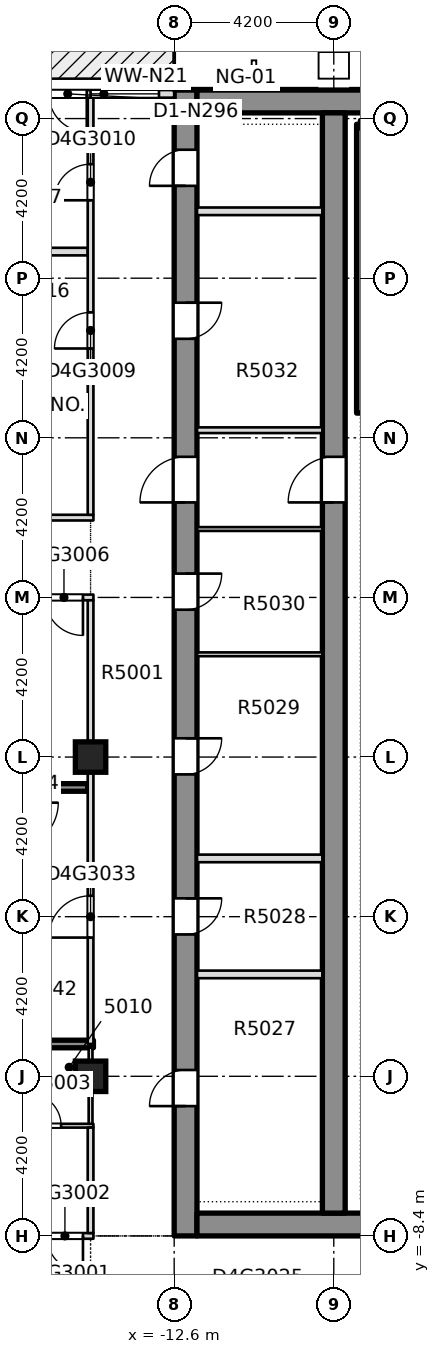
"""IFC4 building model, lengths in metres.
Left out: names, types, materials, properties, quantities, classifications, styles, units other than length and angle.
Written with IfcOpenShell. Run it as: python <this file> out.ifc"""

import sys

from ifc_helpers import new_model, si_unit, direction, frame, frame_2d, origin, origin_2d, place, context, subcontext, project, spatial, rectangle, extrude, element, fill, save


model = new_model("IFC4")
c1 = context("Model", 3, precision=1e-05, world=origin(), true_north=direction((0.0, 1.0)))
c2 = subcontext(c1, "Body", "Model", "MODEL_VIEW")
j1 = project(units=[si_unit("LENGTHUNIT", "METRE"), si_unit("PLANEANGLEUNIT", "RADIAN")], contexts=[c1])
p1 = place(None, origin())
s1 = spatial("IfcSite", under=j1, at=p1, CompositionType="ELEMENT")
p2 = place(p1, origin())
s2 = spatial("IfcBuilding", under=s1, at=p2, CompositionType="ELEMENT")
p3 = place(p2, frame((0.0, 0.0, 192.8)))
s3 = spatial("IfcBuildingStorey", under=s2, at=p3, CompositionType="ELEMENT", Elevation=192.8)
p4 = place(p3, frame((-12.3, -8.4, -0.4), z_axis=(0.0, 0.0, 1.0), x_axis=(0.0, 1.0, 0.0)))
e1 = element("IfcWall", 1, at=p4, inside=s3, PredefinedType="SHEAR", context=c2, shape_type="SweptSolid", body=[
    extrude(rectangle(XDim=30.15, YDim=0.6, at=frame_2d((15.075, 0.0))), origin(), (0.0, 0.0, 1.0), 3.45),
])
p5 = place(p4, frame((3.416, 0.0, 0.4)))
e2 = element("IfcOpeningElement", 2, at=p5, cuts=e1, PredefinedType="OPENING", context=c2, shape_type="SweptSolid", body=[
    extrude(rectangle(XDim=0.95, YDim=2.1, at=frame_2d((0.475, 1.05))), frame((0.0, 0.31, 0.0), z_axis=(0.0, -1.0, 0.0), x_axis=(1.0, 0.0, 0.0)), (0.0, 0.0, 1.0), 0.62),
])
p6 = place(p4, frame((7.932, 0.0, 0.4)))
e3 = element("IfcOpeningElement", 3, at=p6, cuts=e1, PredefinedType="OPENING", context=c2, shape_type="SweptSolid", body=[
    extrude(rectangle(XDim=0.95, YDim=2.1, at=frame_2d((0.475, 1.05))), frame((0.0, 0.31, 0.0), z_axis=(0.0, -1.0, 0.0), x_axis=(1.0, 0.0, 0.0)), (0.0, 0.0, 1.0), 0.62),
])
p7 = place(p4, frame((12.144, 0.0, 0.4)))
e4 = element("IfcOpeningElement", 4, at=p7, cuts=e1, PredefinedType="OPENING", context=c2, shape_type="SweptSolid", body=[
    extrude(rectangle(XDim=0.95, YDim=2.1, at=frame_2d((0.475, 1.05))), frame((0.0, 0.31, 0.0), z_axis=(0.0, -1.0, 0.0), x_axis=(1.0, 0.0, 0.0)), (0.0, 0.0, 1.0), 0.62),
])
p8 = place(p4, frame((16.477, 0.0, 0.4)))
e5 = element("IfcOpeningElement", 5, at=p8, cuts=e1, PredefinedType="OPENING", context=c2, shape_type="SweptSolid", body=[
    extrude(rectangle(XDim=0.95, YDim=2.1, at=frame_2d((0.475, 1.05))), frame((0.0, 0.31, 0.0), z_axis=(0.0, -1.0, 0.0), x_axis=(1.0, 0.0, 0.0)), (0.0, 0.0, 1.0), 0.62),
])
p9 = place(p4, frame((23.605, 0.0, 0.4)))
e6 = element("IfcOpeningElement", 6, at=p9, cuts=e1, PredefinedType="OPENING", context=c2, shape_type="SweptSolid", body=[
    extrude(rectangle(XDim=0.95, YDim=2.1, at=frame_2d((0.475, 1.05))), frame((0.0, 0.31, 0.0), z_axis=(0.0, -1.0, 0.0), x_axis=(1.0, 0.0, 0.0)), (0.0, 0.0, 1.0), 0.62),
])
p10 = place(p4, frame((27.63, 0.0, 0.4)))
e7 = element("IfcOpeningElement", 7, at=p10, cuts=e1, PredefinedType="OPENING", context=c2, shape_type="SweptSolid", body=[
    extrude(rectangle(XDim=0.95, YDim=2.1, at=frame_2d((0.475, 1.05))), frame((0.0, 0.31, 0.0), z_axis=(0.0, -1.0, 0.0), x_axis=(1.0, 0.0, 0.0)), (0.0, 0.0, 1.0), 0.62),
])
p11 = place(p4, frame((19.3, 0.0, 0.4)))
e8 = element("IfcOpeningElement", 8, at=p11, cuts=e1, PredefinedType="OPENING", context=c2, shape_type="SweptSolid", body=[
    extrude(rectangle(XDim=1.2, YDim=2.1, at=frame_2d((0.6, 1.05))), frame((0.0, 0.31, 0.0), z_axis=(0.0, -1.0, 0.0), x_axis=(1.0, 0.0, 0.0)), (0.0, 0.0, 1.0), 0.62),
])
p12 = place(p3, frame((-12.0, -8.1, -0.4), z_axis=(0.0, 0.0, 1.0), x_axis=(1.0, 0.0, 0.0)))
e9 = element("IfcWall", 9, at=p12, inside=s3, PredefinedType="SHEAR", context=c2, shape_type="SweptSolid", body=[
    extrude(rectangle(XDim=24.0, YDim=0.6, at=frame_2d((12.0, 0.0))), origin(), (0.0, 0.0, 1.0), 3.45),
])
p13 = place(p12, frame((7.25, 0.0, 0.4)))
e10 = element("IfcOpeningElement", 10, at=p13, cuts=e9, PredefinedType="OPENING", context=c2, shape_type="SweptSolid", body=[
    extrude(rectangle(XDim=1.8, YDim=2.1, at=frame_2d((0.9, 1.05))), frame((0.0, 0.31, 0.0), z_axis=(0.0, -1.0, 0.0), x_axis=(1.0, 0.0, 0.0)), (0.0, 0.0, 1.0), 0.62),
])
p14 = place(p12, frame((14.95, 0.0, 0.4)))
e11 = element("IfcOpeningElement", 11, at=p14, cuts=e9, PredefinedType="OPENING", context=c2, shape_type="SweptSolid", body=[
    extrude(rectangle(XDim=1.8, YDim=2.1, at=frame_2d((0.9, 1.05))), frame((0.0, 0.31, 0.0), z_axis=(0.0, -1.0, 0.0), x_axis=(1.0, 0.0, 0.0)), (0.0, 0.0, 1.0), 0.62),
])
p15 = place(p3, frame((-12.0, 21.45, -0.4), z_axis=(0.0, 0.0, 1.0), x_axis=(1.0, 0.0, 0.0)))
e12 = element("IfcWall", 12, at=p15, inside=s3, PredefinedType="SHEAR", context=c2, shape_type="SweptSolid", body=[
    extrude(rectangle(XDim=24.0, YDim=0.6, at=frame_2d((12.0, 0.0))), origin(), (0.0, 0.0, 1.0), 3.45),
])
p16 = place(p3, frame((-8.4, -7.8, -0.4), z_axis=(0.0, 0.0, 1.0), x_axis=(0.0, 1.0, 0.0)))
e13 = element("IfcWall", 13, at=p16, inside=s3, PredefinedType="SHEAR", context=c2, shape_type="SweptSolid", body=[
    extrude(rectangle(XDim=28.95, YDim=0.6, at=frame_2d((14.475, 0.0))), origin(), (0.0, 0.0, 1.0), 3.45),
])
p17 = place(p16, frame((18.7, 0.0, 0.4)))
e14 = element("IfcOpeningElement", 14, at=p17, cuts=e13, PredefinedType="OPENING", context=c2, shape_type="SweptSolid", body=[
    extrude(rectangle(XDim=1.2, YDim=2.1, at=frame_2d((0.6, 1.05))), frame((0.0, 0.31, 0.0), z_axis=(0.0, -1.0, 0.0), x_axis=(1.0, 0.0, 0.0)), (0.0, 0.0, 1.0), 0.62),
])
for number, where, z_axis, x_axis in (
    (15, (-14.8, -4.2, -0.4), (0.0, 0.0, 1.0), (1.0, 0.0, 0.0)),
    (16, (-14.8, 4.2, -0.4), (0.0, 0.0, 1.0), (1.0, 0.0, 0.0)),
):
    element("IfcColumn", number, at=place(p3, frame(where, z_axis=z_axis, x_axis=x_axis)), inside=s3, PredefinedType="COLUMN", context=c2, shape_type="SweptSolid", body=[
        extrude(rectangle(XDim=0.8, YDim=0.8, at=origin_2d()), origin(), (0.0, 0.0, 1.0), 3.45),
    ])
p18 = place(p3, frame((-25.75, -8.4, 0.0), z_axis=(0.0, 0.0, 1.0), x_axis=(1.0, 0.0, 0.0)))
e17 = element("IfcWall", 17, at=p18, inside=s3, PredefinedType="PARTITIONING", context=c2, shape_type="SweptSolid", body=[
    extrude(rectangle(XDim=11.025, YDim=0.15, at=frame_2d((5.512, 0.0))), origin(), (0.0, 0.0, 1.0), 3.05),
])
p19 = place(p18, frame((9.8, 0.0, 0.0)))
e18 = element("IfcOpeningElement", 18, at=p19, cuts=e17, PredefinedType="OPENING", context=c2, shape_type="SweptSolid", body=[
    extrude(rectangle(XDim=0.95, YDim=2.1, at=frame_2d((0.475, 1.05))), frame((0.0, 0.085, 0.0), z_axis=(0.0, -1.0, 0.0), x_axis=(1.0, 0.0, 0.0)), (0.0, 0.0, 1.0), 0.17),
])
p20 = place(p3, frame((-17.25, -5.5, 0.0), z_axis=(0.0, 0.0, 1.0), x_axis=(1.0, 0.0, 0.0)))
e19 = element("IfcWall", 19, at=p20, inside=s3, PredefinedType="PARTITIONING", context=c2, shape_type="SweptSolid", body=[
    extrude(rectangle(XDim=2.525, YDim=0.1, at=frame_2d((1.262, 0.0))), origin(), (0.0, 0.0, 1.0), 3.05),
])
p21 = place(p20, frame((0.825, 0.0, 0.0)))
e20 = element("IfcOpeningElement", 20, at=p21, cuts=e19, PredefinedType="OPENING", context=c2, shape_type="SweptSolid", body=[
    extrude(rectangle(XDim=0.85, YDim=2.1, at=frame_2d((0.425, 1.05))), frame((0.0, 0.06, 0.0), z_axis=(0.0, -1.0, 0.0), x_axis=(1.0, 0.0, 0.0)), (0.0, 0.0, 1.0), 0.12),
])
p22 = place(p3, frame((-17.25, -3.35, 0.0), z_axis=(0.0, 0.0, 1.0), x_axis=(1.0, 0.0, 0.0)))
e21 = element("IfcWall", 21, at=p22, inside=s3, PredefinedType="SOLIDWALL", context=c2, shape_type="SweptSolid", body=[
    extrude(rectangle(XDim=2.525, YDim=0.2, at=frame_2d((1.262, 0.0))), origin(), (0.0, 0.0, 1.0), 3.05),
])
p23 = place(p3, frame((-20.45, 3.4, 0.0), z_axis=(0.0, 0.0, 1.0), x_axis=(1.0, 0.0, 0.0)))
e22 = element("IfcWall", 22, at=p23, inside=s3, PredefinedType="SOLIDWALL", context=c2, shape_type="SweptSolid", body=[
    extrude(rectangle(XDim=5.575, YDim=0.2, at=frame_2d((2.788, 0.0))), origin(), (0.0, 0.0, 1.0), 3.05),
])
p24 = place(p3, frame((-25.75, 8.4, 0.0), z_axis=(0.0, 0.0, 1.0), x_axis=(1.0, 0.0, 0.0)))
e23 = element("IfcWall", 23, at=p24, inside=s3, PredefinedType="PARTITIONING", context=c2, shape_type="SweptSolid", body=[
    extrude(rectangle(XDim=11.025, YDim=0.15, at=frame_2d((5.512, 0.0))), origin(), (0.0, 0.0, 1.0), 3.05),
])
p25 = place(p24, frame((9.75, 0.0, 0.0)))
e24 = element("IfcOpeningElement", 24, at=p25, cuts=e23, PredefinedType="OPENING", context=c2, shape_type="SweptSolid", body=[
    extrude(rectangle(XDim=1.0, YDim=2.1, at=frame_2d((0.5, 1.05))), frame((0.0, 0.085, 0.0), z_axis=(0.0, -1.0, 0.0), x_axis=(1.0, 0.0, 0.0)), (0.0, 0.0, 1.0), 0.17),
])
p26 = place(p3, frame((-25.75, 10.5, 0.0), z_axis=(0.0, 0.0, 1.0), x_axis=(1.0, 0.0, 0.0)))
e25 = element("IfcWall", 25, at=p26, inside=s3, PredefinedType="PARTITIONING", context=c2, shape_type="SweptSolid", body=[
    extrude(rectangle(XDim=11.025, YDim=0.15, at=frame_2d((5.512, 0.0))), origin(), (0.0, 0.0, 1.0), 3.05),
])
p27 = place(p26, frame((4.875, 0.0, 0.0)))
e26 = element("IfcOpeningElement", 26, at=p27, cuts=e25, PredefinedType="OPENING", context=c2, shape_type="SweptSolid", body=[
    extrude(rectangle(XDim=1.0, YDim=2.1, at=frame_2d((0.5, 1.05))), frame((0.0, 0.085, 0.0), z_axis=(0.0, -1.0, 0.0), x_axis=(1.0, 0.0, 0.0)), (0.0, 0.0, 1.0), 0.17),
])
for number, where, z_axis, x_axis in (
    (27, (-17.35, 13.35, 0.0), (0.0, 0.0, 1.0), (1.0, 0.0, 0.0)),
    (28, (-17.35, 17.5, 0.0), (0.0, 0.0, 1.0), (1.0, 0.0, 0.0)),
):
    element("IfcWall", number, at=place(p3, frame(where, z_axis=z_axis, x_axis=x_axis)), inside=s3, PredefinedType="PARTITIONING", context=c2, shape_type="SweptSolid", body=[
        extrude(rectangle(XDim=2.475, YDim=0.2, at=frame_2d((1.238, 0.0))), origin(), (0.0, 0.0, 1.0), 3.05),
    ])
p28 = place(p3, frame((-14.8, -8.325, 0.0), z_axis=(0.0, 0.0, 1.0), x_axis=(0.0, 1.0, 0.0)))
e29 = element("IfcWall", 29, at=p28, inside=s3, PredefinedType="PARTITIONING", context=c2, shape_type="SweptSolid", body=[
    extrude(rectangle(XDim=2.775, YDim=0.15, at=frame_2d((1.387, 0.0))), origin(), (0.0, 0.0, 1.0), 3.05),
])
p29 = place(p3, frame((-14.8, -5.45, 0.0), z_axis=(0.0, 0.0, 1.0), x_axis=(0.0, 1.0, 0.0)))
e30 = element("IfcWall", 30, at=p29, inside=s3, PredefinedType="PARTITIONING", context=c2, shape_type="SweptSolid", body=[
    extrude(rectangle(XDim=2.0, YDim=0.1, at=frame_2d((1.0, 0.0))), origin(), (0.0, 0.0, 1.0), 3.05),
])
p30 = place(p3, frame((-14.8, -3.35, 0.0), z_axis=(0.0, 0.0, 1.0), x_axis=(0.0, 1.0, 0.0)))
e31 = element("IfcWall", 31, at=p30, inside=s3, PredefinedType="PARTITIONING", context=c2, shape_type="SweptSolid", body=[
    extrude(rectangle(XDim=11.675, YDim=0.15, at=frame_2d((5.837, 0.0))), origin(), (0.0, 0.0, 1.0), 3.05),
])
p31 = place(p30, frame((2.8, 0.0, 0.0)))
e32 = element("IfcOpeningElement", 32, at=p31, cuts=e31, PredefinedType="OPENING", context=c2, shape_type="SweptSolid", body=[
    extrude(rectangle(XDim=1.1, YDim=2.1, at=frame_2d((0.55, 1.05))), frame((0.0, 0.085, 0.0), z_axis=(0.0, -1.0, 0.0), x_axis=(1.0, 0.0, 0.0)), (0.0, 0.0, 1.0), 0.17),
])
p32 = place(p3, frame((-14.8, 10.575, 0.0), z_axis=(0.0, 0.0, 1.0), x_axis=(0.0, 1.0, 0.0)))
e33 = element("IfcWall", 33, at=p32, inside=s3, PredefinedType="PARTITIONING", context=c2, shape_type="SweptSolid", body=[
    extrude(rectangle(XDim=10.975, YDim=0.15, at=frame_2d((5.488, 0.0))), origin(), (0.0, 0.0, 1.0), 3.05),
])
p33 = place(p32, frame((4.375, 0.0, 0.0)))
e34 = element("IfcOpeningElement", 34, at=p33, cuts=e33, PredefinedType="OPENING", context=c2, shape_type="SweptSolid", body=[
    extrude(rectangle(XDim=0.95, YDim=2.1, at=frame_2d((0.475, 1.05))), frame((0.0, 0.085, 0.0), z_axis=(0.0, -1.0, 0.0), x_axis=(1.0, 0.0, 0.0)), (0.0, 0.0, 1.0), 0.17),
])
p34 = place(p32, frame((8.275, 0.0, 0.0)))
e35 = element("IfcOpeningElement", 35, at=p34, cuts=e33, PredefinedType="OPENING", context=c2, shape_type="SweptSolid", body=[
    extrude(rectangle(XDim=0.95, YDim=2.1, at=frame_2d((0.475, 1.05))), frame((0.0, 0.085, 0.0), z_axis=(0.0, -1.0, 0.0), x_axis=(1.0, 0.0, 0.0)), (0.0, 0.0, 1.0), 0.17),
])
p35 = place(p3, frame((-12.6, 21.65, 0.0), z_axis=(0.0, 0.0, 1.0), x_axis=(-1.0, 0.0, 0.0)))
e36 = element("IfcWall", 36, at=p35, inside=s3, PredefinedType="STANDARD", context=c2, shape_type="SweptSolid", body=[
    extrude(rectangle(XDim=3.7, YDim=0.2, at=frame_2d((1.85, 0.0))), origin(), (0.0, 0.0, 1.0), 3.05),
])
p36 = place(p35, frame((0.4, 0.0, 0.2)))
e37 = element("IfcOpeningElement", 37, at=p36, cuts=e36, PredefinedType="OPENING", context=c2, shape_type="SweptSolid", body=[
    extrude(rectangle(XDim=1.8, YDim=2.65, at=frame_2d((0.9, 1.325))), frame((0.0, 0.11, 0.0), z_axis=(0.0, -1.0, 0.0), x_axis=(1.0, 0.0, 0.0)), (0.0, 0.0, 1.0), 0.22),
])
p37 = place(p35, frame((2.3, 0.0, 0.0)))
e38 = element("IfcOpeningElement", 38, at=p37, cuts=e36, PredefinedType="OPENING", context=c2, shape_type="SweptSolid", body=[
    extrude(rectangle(XDim=1.0, YDim=2.4, at=frame_2d((0.5, 1.2))), frame((0.0, 0.11, 0.0), z_axis=(0.0, -1.0, 0.0), x_axis=(1.0, 0.0, 0.0)), (0.0, 0.0, 1.0), 0.22),
])
for number, where, z_axis, x_axis in (
    (39, (-11.999, -1.519, 0.0), (0.0, 0.0, 1.0), (1.0, 0.0, 0.0)),
    (40, (-11.999, 1.533, 0.0), (0.0, 0.0, 1.0), (1.0, 0.0, 0.0)),
):
    element("IfcWall", number, at=place(p3, frame(where, z_axis=z_axis, x_axis=x_axis)), inside=s3, PredefinedType="PARTITIONING", context=c2, shape_type="SweptSolid", body=[
        extrude(rectangle(XDim=3.298, YDim=0.2, at=frame_2d((1.649, 0.0))), origin(), (0.0, 0.0, 1.0), 3.05),
    ])
for number, where, z_axis, x_axis in (
    (41, (-11.999, 6.904, 0.0), (0.0, 0.0, 1.0), (1.0, 0.0, 0.0)),
    (42, (-11.999, 10.2, 0.0), (0.0, 0.0, 1.0), (1.0, 0.0, 0.0)),
):
    element("IfcWall", number, at=place(p3, frame(where, z_axis=z_axis, x_axis=x_axis)), inside=s3, PredefinedType="PARTITIONING", context=c2, shape_type="SweptSolid", body=[
        extrude(rectangle(XDim=3.298, YDim=0.1, at=frame_2d((1.649, 0.0))), origin(), (0.0, 0.0, 1.0), 3.05),
    ])
p38 = place(p3, frame((-11.999, 12.8, 0.0), z_axis=(0.0, 0.0, 1.0), x_axis=(1.0, 0.0, 0.0)))
e43 = element("IfcWall", 43, at=p38, inside=s3, PredefinedType="PARTITIONING", context=c2, shape_type="SweptSolid", body=[
    extrude(rectangle(XDim=3.298, YDim=0.15, at=frame_2d((1.649, 0.0))), origin(), (0.0, 0.0, 1.0), 3.05),
])
p39 = place(p3, frame((-11.999, 18.56, 0.0), z_axis=(0.0, 0.0, 1.0), x_axis=(1.0, 0.0, 0.0)))
e44 = element("IfcWall", 44, at=p39, inside=s3, PredefinedType="PARTITIONING", context=c2, shape_type="SweptSolid", body=[
    extrude(rectangle(XDim=3.298, YDim=0.2, at=frame_2d((1.649, 0.0))), origin(), (0.0, 0.0, 1.0), 3.05),
])
p40 = place(p3, frame((-7.7, 13.25, 0.0), z_axis=(0.0, 0.0, 1.0), x_axis=(0.0, 1.0, 0.0)))
e45 = element("IfcWall", 45, at=p40, inside=s3, PredefinedType="SOLIDWALL", context=c2, shape_type="SweptSolid", body=[
    extrude(rectangle(XDim=7.6, YDim=0.2, at=frame_2d((3.8, 0.0))), origin(), (0.0, 0.0, 1.0), 3.05),
])
p41 = place(p3, frame((-7.7, 20.85, 0.0), z_axis=(0.0, 0.0, 1.0), x_axis=(1.0, 0.0, 0.0)))
e46 = element("IfcWall", 46, at=p41, inside=s3, PredefinedType="SOLIDWALL", context=c2, shape_type="SweptSolid", body=[
    extrude(rectangle(XDim=3.55, YDim=0.2, at=frame_2d((1.775, 0.0))), origin(), (0.0, 0.0, 1.0), 3.05),
])
p42 = place(p19, origin())
e47 = element("IfcDoor", 47, at=p42, inside=s3, OperationType="SINGLE_SWING_LEFT", PredefinedType="DOOR", context=c2, shape_type="SweptSolid", body=[
    extrude(rectangle(XDim=0.95, YDim=2.1, at=frame_2d((0.475, 1.05))), frame((0.0, 0.025, 0.0), z_axis=(0.0, -1.0, 0.0), x_axis=(1.0, 0.0, 0.0)), (0.0, 0.0, 1.0), 0.05),
])
fill(e18, e47)
p43 = place(p21, origin())
e48 = element("IfcDoor", 48, at=p43, inside=s3, OperationType="SINGLE_SWING_LEFT", PredefinedType="DOOR", context=c2, shape_type="SweptSolid", body=[
    extrude(rectangle(XDim=0.85, YDim=2.1, at=frame_2d((0.425, 1.05))), frame((0.0, 0.025, 0.0), z_axis=(0.0, -1.0, 0.0), x_axis=(1.0, 0.0, 0.0)), (0.0, 0.0, 1.0), 0.05),
])
fill(e20, e48)
p44 = place(p25, origin())
e49 = element("IfcDoor", 49, at=p44, inside=s3, OperationType="SINGLE_SWING_RIGHT", PredefinedType="DOOR", context=c2, shape_type="SweptSolid", body=[
    extrude(rectangle(XDim=1.0, YDim=2.1, at=frame_2d((0.5, 1.05))), frame((0.0, 0.025, 0.0), z_axis=(0.0, -1.0, 0.0), x_axis=(1.0, 0.0, 0.0)), (0.0, 0.0, 1.0), 0.05),
])
fill(e24, e49)
p45 = place(p33, origin())
e50 = element("IfcDoor", 50, at=p45, inside=s3, OperationType="SINGLE_SWING_LEFT", PredefinedType="DOOR", context=c2, shape_type="SweptSolid", body=[
    extrude(rectangle(XDim=0.95, YDim=2.1, at=frame_2d((0.475, 1.05))), frame((0.0, 0.025, 0.0), z_axis=(0.0, -1.0, 0.0), x_axis=(1.0, 0.0, 0.0)), (0.0, 0.0, 1.0), 0.05),
])
fill(e34, e50)
p46 = place(p34, origin())
e51 = element("IfcDoor", 51, at=p46, inside=s3, OperationType="SINGLE_SWING_RIGHT", PredefinedType="DOOR", context=c2, shape_type="SweptSolid", body=[
    extrude(rectangle(XDim=0.95, YDim=2.1, at=frame_2d((0.475, 1.05))), frame((0.0, 0.025, 0.0), z_axis=(0.0, -1.0, 0.0), x_axis=(1.0, 0.0, 0.0)), (0.0, 0.0, 1.0), 0.05),
])
fill(e35, e51)
p47 = place(p31, origin())
e52 = element("IfcDoor", 52, at=p47, inside=s3, OperationType="SINGLE_SWING_RIGHT", PredefinedType="DOOR", context=c2, shape_type="SweptSolid", body=[
    extrude(rectangle(XDim=1.1, YDim=2.1, at=frame_2d((0.55, 1.05))), frame((0.0, 0.025, 0.0), z_axis=(0.0, -1.0, 0.0), x_axis=(1.0, 0.0, 0.0)), (0.0, 0.0, 1.0), 0.05),
])
fill(e32, e52)
p48 = place(p36, origin())
e53 = element("IfcWindow", 53, at=p48, inside=s3, PartitioningType="SINGLE_PANEL", PredefinedType="WINDOW", context=c2, shape_type="SweptSolid", body=[
    extrude(rectangle(XDim=1.8, YDim=2.65, at=frame_2d((0.9, 1.325))), frame((0.0, 0.03, 0.0), z_axis=(0.0, -1.0, 0.0), x_axis=(1.0, 0.0, 0.0)), (0.0, 0.0, 1.0), 0.06),
])
fill(e37, e53)
p49 = place(p37, origin())
e54 = element("IfcDoor", 54, at=p49, inside=s3, OperationType="SINGLE_SWING_LEFT", PredefinedType="DOOR", context=c2, shape_type="SweptSolid", body=[
    extrude(rectangle(XDim=1.0, YDim=2.4, at=frame_2d((0.5, 1.2))), frame((0.0, 0.025, 0.0), z_axis=(0.0, -1.0, 0.0), x_axis=(1.0, 0.0, 0.0)), (0.0, 0.0, 1.0), 0.05),
])
fill(e38, e54)
p50 = place(p5, origin())
e55 = element("IfcDoor", 55, at=p50, inside=s3, OperationType="SINGLE_SWING_LEFT", PredefinedType="DOOR", context=c2, shape_type="SweptSolid", body=[
    extrude(rectangle(XDim=0.95, YDim=2.1, at=frame_2d((0.475, 1.05))), frame((0.0, 0.025, 0.0), z_axis=(0.0, -1.0, 0.0), x_axis=(1.0, 0.0, 0.0)), (0.0, 0.0, 1.0), 0.05),
])
fill(e2, e55)
p51 = place(p6, origin())
e56 = element("IfcDoor", 56, at=p51, inside=s3, OperationType="SINGLE_SWING_LEFT", PredefinedType="DOOR", context=c2, shape_type="SweptSolid", body=[
    extrude(rectangle(XDim=0.95, YDim=2.1, at=frame_2d((0.475, 1.05))), frame((0.0, 0.025, 0.0), z_axis=(0.0, -1.0, 0.0), x_axis=(1.0, 0.0, 0.0)), (0.0, 0.0, 1.0), 0.05),
])
fill(e3, e56)
p52 = place(p7, origin())
e57 = element("IfcDoor", 57, at=p52, inside=s3, OperationType="SINGLE_SWING_LEFT", PredefinedType="DOOR", context=c2, shape_type="SweptSolid", body=[
    extrude(rectangle(XDim=0.95, YDim=2.1, at=frame_2d((0.475, 1.05))), frame((0.0, 0.025, 0.0), z_axis=(0.0, -1.0, 0.0), x_axis=(1.0, 0.0, 0.0)), (0.0, 0.0, 1.0), 0.05),
])
fill(e4, e57)
p53 = place(p8, origin())
e58 = element("IfcDoor", 58, at=p53, inside=s3, OperationType="SINGLE_SWING_LEFT", PredefinedType="DOOR", context=c2, shape_type="SweptSolid", body=[
    extrude(rectangle(XDim=0.95, YDim=2.1, at=frame_2d((0.475, 1.05))), frame((0.0, 0.025, 0.0), z_axis=(0.0, -1.0, 0.0), x_axis=(1.0, 0.0, 0.0)), (0.0, 0.0, 1.0), 0.05),
])
fill(e5, e58)
p54 = place(p9, origin())
e59 = element("IfcDoor", 59, at=p54, inside=s3, OperationType="SINGLE_SWING_LEFT", PredefinedType="DOOR", context=c2, shape_type="SweptSolid", body=[
    extrude(rectangle(XDim=0.95, YDim=2.1, at=frame_2d((0.475, 1.05))), frame((0.0, 0.025, 0.0), z_axis=(0.0, -1.0, 0.0), x_axis=(1.0, 0.0, 0.0)), (0.0, 0.0, 1.0), 0.05),
])
fill(e6, e59)
p55 = place(p10, origin())
e60 = element("IfcDoor", 60, at=p55, inside=s3, OperationType="SINGLE_SWING_LEFT", PredefinedType="DOOR", context=c2, shape_type="SweptSolid", body=[
    extrude(rectangle(XDim=0.95, YDim=2.1, at=frame_2d((0.475, 1.05))), frame((0.0, 0.025, 0.0), z_axis=(0.0, -1.0, 0.0), x_axis=(1.0, 0.0, 0.0)), (0.0, 0.0, 1.0), 0.05),
])
fill(e7, e60)
p56 = place(p11, origin())
e61 = element("IfcDoor", 61, at=p56, inside=s3, OperationType="SINGLE_SWING_LEFT", PredefinedType="DOOR", context=c2, shape_type="SweptSolid", body=[
    extrude(rectangle(XDim=1.2, YDim=2.1, at=frame_2d((0.6, 1.05))), frame((0.0, 0.025, 0.0), z_axis=(0.0, -1.0, 0.0), x_axis=(1.0, 0.0, 0.0)), (0.0, 0.0, 1.0), 0.05),
])
fill(e8, e61)
p57 = place(p17, origin())
e62 = element("IfcDoor", 62, at=p57, inside=s3, OperationType="SINGLE_SWING_LEFT", PredefinedType="DOOR", context=c2, shape_type="SweptSolid", body=[
    extrude(rectangle(XDim=1.2, YDim=2.1, at=frame_2d((0.6, 1.05))), frame((0.0, 0.025, 0.0), z_axis=(0.0, -1.0, 0.0), x_axis=(1.0, 0.0, 0.0)), (0.0, 0.0, 1.0), 0.05),
])
fill(e14, e62)
save(model, sys.argv[1])
